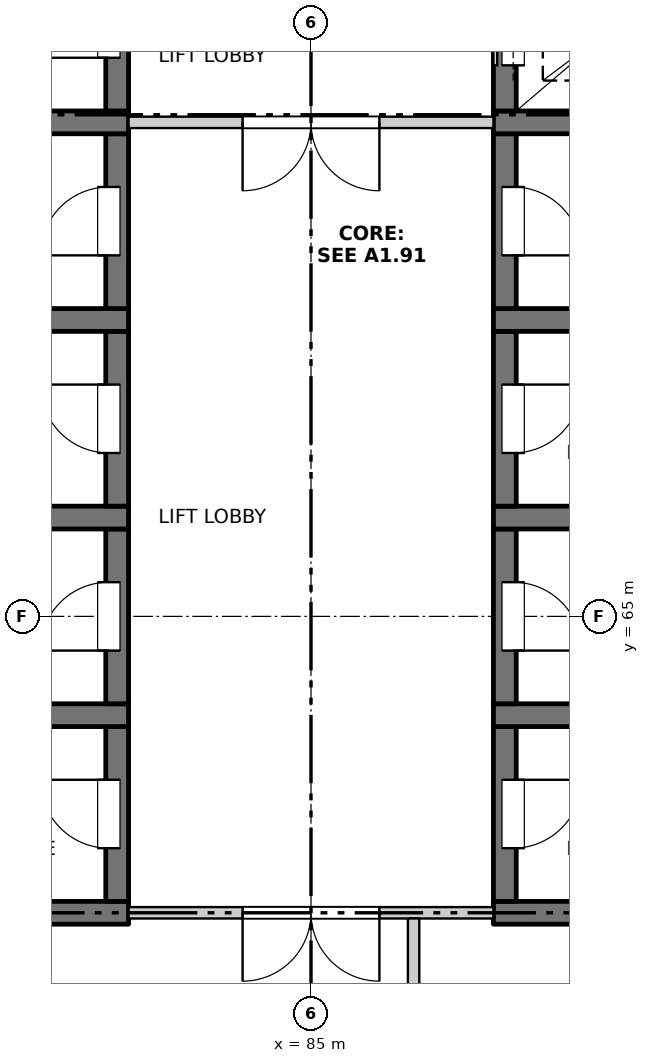
"""IFC4 building model, lengths in metres.
Left out: names, types, materials, properties, quantities, classifications, styles, units other than length and angle.
Written with IfcOpenShell. Run it as: python <this file> out.ifc"""

import sys

from ifc_helpers import new_model, si_unit, direction, frame, frame_2d, origin, place, context, subcontext, project, spatial, rectangle, extrude, element, fill, save


model = new_model("IFC4")
c1 = context("Model", 3, precision=1e-05, world=origin(), true_north=direction((0.0, 1.0)))
c2 = subcontext(c1, "Body", "Model", "MODEL_VIEW")
j1 = project(units=[si_unit("LENGTHUNIT", "METRE"), si_unit("PLANEANGLEUNIT", "RADIAN")], contexts=[c1])
p1 = place(None, origin())
s1 = spatial("IfcSite", under=j1, at=p1, CompositionType="ELEMENT")
p2 = place(p1, origin())
s2 = spatial("IfcBuilding", under=s1, at=p2, CompositionType="ELEMENT")
p3 = place(p2, frame((0.0, 0.0, 140.7)))
s3 = spatial("IfcBuildingStorey", under=s2, at=p3, CompositionType="ELEMENT", Elevation=140.7)
p4 = place(p3, frame((79.6, 61.1, -0.25), z_axis=(0.0, 0.0, 1.0), x_axis=(1.0, 0.0, 0.0)))
e1 = element("IfcWall", 1, at=p4, inside=s3, PredefinedType="SOLIDWALL", context=c2, shape_type="SweptSolid", body=[
    extrude(rectangle(XDim=3.0, YDim=0.3, at=frame_2d((1.5, 0.0))), origin(), (0.0, 0.0, 1.0), 3.35),
])
p5 = place(p3, frame((82.45, 61.25, -0.25), z_axis=(0.0, 0.0, 1.0), x_axis=(0.0, 1.0, 0.0)))
e2 = element("IfcWall", 2, at=p5, inside=s3, PredefinedType="SOLIDWALL", context=c2, shape_type="SweptSolid", body=[
    extrude(rectangle(XDim=2.3, YDim=0.3, at=frame_2d((1.15, 0.0))), origin(), (0.0, 0.0, 1.0), 3.35),
])
p6 = place(p5, frame((0.7, 0.0, 0.25)))
e3 = element("IfcOpeningElement", 3, at=p6, cuts=e2, PredefinedType="OPENING", context=c2, shape_type="SweptSolid", body=[
    extrude(rectangle(XDim=0.9, YDim=2.1, at=frame_2d((0.45, 1.05))), frame((0.0, 0.16, 0.0), z_axis=(0.0, -1.0, 0.0), x_axis=(1.0, 0.0, 0.0)), (0.0, 0.0, 1.0), 0.32),
])
p7 = place(p3, frame((79.6, 63.7, -0.25), z_axis=(0.0, 0.0, 1.0), x_axis=(1.0, 0.0, 0.0)))
e4 = element("IfcWall", 4, at=p7, inside=s3, PredefinedType="SOLIDWALL", context=c2, shape_type="SweptSolid", body=[
    extrude(rectangle(XDim=3.0, YDim=0.3, at=frame_2d((1.5, 0.0))), origin(), (0.0, 0.0, 1.0), 3.35),
])
p8 = place(p3, frame((82.45, 63.85, -0.25), z_axis=(0.0, 0.0, 1.0), x_axis=(0.0, 1.0, 0.0)))
e5 = element("IfcWall", 5, at=p8, inside=s3, PredefinedType="SOLIDWALL", context=c2, shape_type="SweptSolid", body=[
    extrude(rectangle(XDim=2.3, YDim=0.3, at=frame_2d((1.15, 0.0))), origin(), (0.0, 0.0, 1.0), 3.35),
])
p9 = place(p8, frame((0.7, 0.0, 0.25)))
e6 = element("IfcOpeningElement", 6, at=p9, cuts=e5, PredefinedType="OPENING", context=c2, shape_type="SweptSolid", body=[
    extrude(rectangle(XDim=0.9, YDim=2.1, at=frame_2d((0.45, 1.05))), frame((0.0, 0.16, 0.0), z_axis=(0.0, -1.0, 0.0), x_axis=(1.0, 0.0, 0.0)), (0.0, 0.0, 1.0), 0.32),
])
p10 = place(p3, frame((79.6, 66.3, -0.25), z_axis=(0.0, 0.0, 1.0), x_axis=(1.0, 0.0, 0.0)))
e7 = element("IfcWall", 7, at=p10, inside=s3, PredefinedType="SOLIDWALL", context=c2, shape_type="SweptSolid", body=[
    extrude(rectangle(XDim=3.0, YDim=0.3, at=frame_2d((1.5, 0.0))), origin(), (0.0, 0.0, 1.0), 3.35),
])
p11 = place(p3, frame((82.45, 66.45, -0.25), z_axis=(0.0, 0.0, 1.0), x_axis=(0.0, 1.0, 0.0)))
e8 = element("IfcWall", 8, at=p11, inside=s3, PredefinedType="SOLIDWALL", context=c2, shape_type="SweptSolid", body=[
    extrude(rectangle(XDim=2.3, YDim=0.3, at=frame_2d((1.15, 0.0))), origin(), (0.0, 0.0, 1.0), 3.35),
])
p12 = place(p11, frame((0.7, 0.0, 0.25)))
e9 = element("IfcOpeningElement", 9, at=p12, cuts=e8, PredefinedType="OPENING", context=c2, shape_type="SweptSolid", body=[
    extrude(rectangle(XDim=0.9, YDim=2.1, at=frame_2d((0.45, 1.05))), frame((0.0, 0.16, 0.0), z_axis=(0.0, -1.0, 0.0), x_axis=(1.0, 0.0, 0.0)), (0.0, 0.0, 1.0), 0.32),
])
p13 = place(p3, frame((79.6, 68.9, -0.25), z_axis=(0.0, 0.0, 1.0), x_axis=(1.0, 0.0, 0.0)))
e10 = element("IfcWall", 10, at=p13, inside=s3, PredefinedType="SOLIDWALL", context=c2, shape_type="SweptSolid", body=[
    extrude(rectangle(XDim=3.0, YDim=0.3, at=frame_2d((1.5, 0.0))), origin(), (0.0, 0.0, 1.0), 3.35),
])
p14 = place(p3, frame((82.45, 69.05, -0.25), z_axis=(0.0, 0.0, 1.0), x_axis=(0.0, 1.0, 0.0)))
e11 = element("IfcWall", 11, at=p14, inside=s3, PredefinedType="SOLIDWALL", context=c2, shape_type="SweptSolid", body=[
    extrude(rectangle(XDim=2.3, YDim=0.3, at=frame_2d((1.15, 0.0))), origin(), (0.0, 0.0, 1.0), 3.35),
])
p15 = place(p14, frame((0.7, 0.0, 0.25)))
e12 = element("IfcOpeningElement", 12, at=p15, cuts=e11, PredefinedType="OPENING", context=c2, shape_type="SweptSolid", body=[
    extrude(rectangle(XDim=0.9, YDim=2.1, at=frame_2d((0.45, 1.05))), frame((0.0, 0.16, 0.0), z_axis=(0.0, -1.0, 0.0), x_axis=(1.0, 0.0, 0.0)), (0.0, 0.0, 1.0), 0.32),
])
p16 = place(p3, frame((79.6, 71.5, -0.25), z_axis=(0.0, 0.0, 1.0), x_axis=(1.0, 0.0, 0.0)))
e13 = element("IfcWall", 13, at=p16, inside=s3, PredefinedType="SOLIDWALL", context=c2, shape_type="SweptSolid", body=[
    extrude(rectangle(XDim=3.0, YDim=0.3, at=frame_2d((1.5, 0.0))), origin(), (0.0, 0.0, 1.0), 3.35),
])
p17 = place(p3, frame((82.45, 71.65, -0.25), z_axis=(0.0, 0.0, 1.0), x_axis=(0.0, 1.0, 0.0)))
e14 = element("IfcWall", 14, at=p17, inside=s3, PredefinedType="SOLIDWALL", context=c2, shape_type="SweptSolid", body=[
    extrude(rectangle(XDim=2.3, YDim=0.3, at=frame_2d((1.15, 0.0))), origin(), (0.0, 0.0, 1.0), 3.35),
])
p18 = place(p17, frame((0.7, 0.0, 0.25)))
e15 = element("IfcOpeningElement", 15, at=p18, cuts=e14, PredefinedType="OPENING", context=c2, shape_type="SweptSolid", body=[
    extrude(rectangle(XDim=0.9, YDim=2.1, at=frame_2d((0.45, 1.05))), frame((0.0, 0.16, 0.0), z_axis=(0.0, -1.0, 0.0), x_axis=(1.0, 0.0, 0.0)), (0.0, 0.0, 1.0), 0.32),
])
p19 = place(p3, frame((87.4, 61.1, -0.25), z_axis=(0.0, 0.0, 1.0), x_axis=(1.0, 0.0, 0.0)))
e16 = element("IfcWall", 16, at=p19, inside=s3, PredefinedType="SOLIDWALL", context=c2, shape_type="SweptSolid", body=[
    extrude(rectangle(XDim=3.0, YDim=0.3, at=frame_2d((1.5, 0.0))), origin(), (0.0, 0.0, 1.0), 3.35),
])
p20 = place(p3, frame((87.55, 61.25, -0.25), z_axis=(0.0, 0.0, 1.0), x_axis=(0.0, 1.0, 0.0)))
e17 = element("IfcWall", 17, at=p20, inside=s3, PredefinedType="SOLIDWALL", context=c2, shape_type="SweptSolid", body=[
    extrude(rectangle(XDim=2.3, YDim=0.3, at=frame_2d((1.15, 0.0))), origin(), (0.0, 0.0, 1.0), 3.35),
])
p21 = place(p20, frame((0.7, 0.0, 0.25)))
e18 = element("IfcOpeningElement", 18, at=p21, cuts=e17, PredefinedType="OPENING", context=c2, shape_type="SweptSolid", body=[
    extrude(rectangle(XDim=0.9, YDim=2.1, at=frame_2d((0.45, 1.05))), frame((0.0, 0.16, 0.0), z_axis=(0.0, -1.0, 0.0), x_axis=(1.0, 0.0, 0.0)), (0.0, 0.0, 1.0), 0.32),
])
p22 = place(p3, frame((87.4, 63.7, -0.25), z_axis=(0.0, 0.0, 1.0), x_axis=(1.0, 0.0, 0.0)))
e19 = element("IfcWall", 19, at=p22, inside=s3, PredefinedType="SOLIDWALL", context=c2, shape_type="SweptSolid", body=[
    extrude(rectangle(XDim=3.0, YDim=0.3, at=frame_2d((1.5, 0.0))), origin(), (0.0, 0.0, 1.0), 3.35),
])
p23 = place(p3, frame((87.55, 63.85, -0.25), z_axis=(0.0, 0.0, 1.0), x_axis=(0.0, 1.0, 0.0)))
e20 = element("IfcWall", 20, at=p23, inside=s3, PredefinedType="SOLIDWALL", context=c2, shape_type="SweptSolid", body=[
    extrude(rectangle(XDim=2.3, YDim=0.3, at=frame_2d((1.15, 0.0))), origin(), (0.0, 0.0, 1.0), 3.35),
])
p24 = place(p23, frame((0.7, 0.0, 0.25)))
e21 = element("IfcOpeningElement", 21, at=p24, cuts=e20, PredefinedType="OPENING", context=c2, shape_type="SweptSolid", body=[
    extrude(rectangle(XDim=0.9, YDim=2.1, at=frame_2d((0.45, 1.05))), frame((0.0, 0.16, 0.0), z_axis=(0.0, -1.0, 0.0), x_axis=(1.0, 0.0, 0.0)), (0.0, 0.0, 1.0), 0.32),
])
p25 = place(p3, frame((87.4, 66.3, -0.25), z_axis=(0.0, 0.0, 1.0), x_axis=(1.0, 0.0, 0.0)))
e22 = element("IfcWall", 22, at=p25, inside=s3, PredefinedType="SOLIDWALL", context=c2, shape_type="SweptSolid", body=[
    extrude(rectangle(XDim=3.0, YDim=0.3, at=frame_2d((1.5, 0.0))), origin(), (0.0, 0.0, 1.0), 3.35),
])
p26 = place(p3, frame((87.55, 66.45, -0.25), z_axis=(0.0, 0.0, 1.0), x_axis=(0.0, 1.0, 0.0)))
e23 = element("IfcWall", 23, at=p26, inside=s3, PredefinedType="SOLIDWALL", context=c2, shape_type="SweptSolid", body=[
    extrude(rectangle(XDim=2.3, YDim=0.3, at=frame_2d((1.15, 0.0))), origin(), (0.0, 0.0, 1.0), 3.35),
])
p27 = place(p26, frame((0.7, 0.0, 0.25)))
e24 = element("IfcOpeningElement", 24, at=p27, cuts=e23, PredefinedType="OPENING", context=c2, shape_type="SweptSolid", body=[
    extrude(rectangle(XDim=0.9, YDim=2.1, at=frame_2d((0.45, 1.05))), frame((0.0, 0.16, 0.0), z_axis=(0.0, -1.0, 0.0), x_axis=(1.0, 0.0, 0.0)), (0.0, 0.0, 1.0), 0.32),
])
p28 = place(p3, frame((87.4, 68.9, -0.25), z_axis=(0.0, 0.0, 1.0), x_axis=(1.0, 0.0, 0.0)))
e25 = element("IfcWall", 25, at=p28, inside=s3, PredefinedType="SOLIDWALL", context=c2, shape_type="SweptSolid", body=[
    extrude(rectangle(XDim=3.0, YDim=0.3, at=frame_2d((1.5, 0.0))), origin(), (0.0, 0.0, 1.0), 3.35),
])
p29 = place(p3, frame((87.55, 69.05, -0.25), z_axis=(0.0, 0.0, 1.0), x_axis=(0.0, 1.0, 0.0)))
e26 = element("IfcWall", 26, at=p29, inside=s3, PredefinedType="SOLIDWALL", context=c2, shape_type="SweptSolid", body=[
    extrude(rectangle(XDim=2.3, YDim=0.3, at=frame_2d((1.15, 0.0))), origin(), (0.0, 0.0, 1.0), 3.35),
])
p30 = place(p29, frame((0.7, 0.0, 0.25)))
e27 = element("IfcOpeningElement", 27, at=p30, cuts=e26, PredefinedType="OPENING", context=c2, shape_type="SweptSolid", body=[
    extrude(rectangle(XDim=0.9, YDim=2.1, at=frame_2d((0.45, 1.05))), frame((0.0, 0.16, 0.0), z_axis=(0.0, -1.0, 0.0), x_axis=(1.0, 0.0, 0.0)), (0.0, 0.0, 1.0), 0.32),
])
p31 = place(p3, frame((87.4, 71.5, -0.25), z_axis=(0.0, 0.0, 1.0), x_axis=(1.0, 0.0, 0.0)))
e28 = element("IfcWall", 28, at=p31, inside=s3, PredefinedType="SOLIDWALL", context=c2, shape_type="SweptSolid", body=[
    extrude(rectangle(XDim=3.0, YDim=0.3, at=frame_2d((1.5, 0.0))), origin(), (0.0, 0.0, 1.0), 3.35),
])
p32 = place(p3, frame((87.55, 71.65, -0.25), z_axis=(0.0, 0.0, 1.0), x_axis=(0.0, 1.0, 0.0)))
e29 = element("IfcWall", 29, at=p32, inside=s3, PredefinedType="SOLIDWALL", context=c2, shape_type="SweptSolid", body=[
    extrude(rectangle(XDim=2.3, YDim=0.3, at=frame_2d((1.15, 0.0))), origin(), (0.0, 0.0, 1.0), 3.35),
])
p33 = place(p32, frame((0.6, 0.0, 0.25)))
e30 = element("IfcOpeningElement", 30, at=p33, cuts=e29, PredefinedType="OPENING", context=c2, shape_type="SweptSolid", body=[
    extrude(rectangle(XDim=1.1, YDim=2.1, at=frame_2d((0.55, 1.05))), frame((0.0, 0.16, 0.0), z_axis=(0.0, -1.0, 0.0), x_axis=(1.0, 0.0, 0.0)), (0.0, 0.0, 1.0), 0.32),
])
p34 = place(p3, frame((82.6, 61.1, 0.0), z_axis=(0.0, 0.0, 1.0), x_axis=(1.0, 0.0, 0.0)))
e31 = element("IfcWall", 31, at=p34, inside=s3, PredefinedType="PARTITIONING", context=c2, shape_type="SweptSolid", body=[
    extrude(rectangle(XDim=4.8, YDim=0.15, at=frame_2d((2.4, 0.0))), origin(), (0.0, 0.0, 1.0), 3.1),
])
p35 = place(p34, frame((1.5, 0.0, 0.0)))
e32 = element("IfcOpeningElement", 32, at=p35, cuts=e31, PredefinedType="OPENING", context=c2, shape_type="SweptSolid", body=[
    extrude(rectangle(XDim=1.8, YDim=2.1, at=frame_2d((0.9, 1.05))), frame((0.0, 0.085, 0.0), z_axis=(0.0, -1.0, 0.0), x_axis=(1.0, 0.0, 0.0)), (0.0, 0.0, 1.0), 0.17),
])
p36 = place(p3, frame((82.6, 71.5, 0.0), z_axis=(0.0, 0.0, 1.0), x_axis=(1.0, 0.0, 0.0)))
e33 = element("IfcWall", 33, at=p36, inside=s3, PredefinedType="PARTITIONING", context=c2, shape_type="SweptSolid", body=[
    extrude(rectangle(XDim=4.8, YDim=0.15, at=frame_2d((2.4, 0.0))), origin(), (0.0, 0.0, 1.0), 3.1),
])
p37 = place(p36, frame((1.5, 0.0, 0.0)))
e34 = element("IfcOpeningElement", 34, at=p37, cuts=e33, PredefinedType="OPENING", context=c2, shape_type="SweptSolid", body=[
    extrude(rectangle(XDim=1.8, YDim=2.1, at=frame_2d((0.9, 1.05))), frame((0.0, 0.085, 0.0), z_axis=(0.0, -1.0, 0.0), x_axis=(1.0, 0.0, 0.0)), (0.0, 0.0, 1.0), 0.17),
])
p38 = place(p3, frame((86.35, 55.525, 0.0), z_axis=(0.0, 0.0, 1.0), x_axis=(0.0, 1.0, 0.0)))
e35 = element("IfcWall", 35, at=p38, inside=s3, PredefinedType="PARTITIONING", context=c2, shape_type="SweptSolid", body=[
    extrude(rectangle(XDim=5.5, YDim=0.15, at=frame_2d((2.75, 0.0))), origin(), (0.0, 0.0, 1.0), 3.1),
])
p39 = place(p38, frame((2.175, 0.0, 0.0)))
e36 = element("IfcOpeningElement", 36, at=p39, cuts=e35, PredefinedType="OPENING", context=c2, shape_type="SweptSolid", body=[
    extrude(rectangle(XDim=0.9, YDim=2.1, at=frame_2d((0.45, 1.05))), frame((0.0, 0.085, 0.0), z_axis=(0.0, -1.0, 0.0), x_axis=(1.0, 0.0, 0.0)), (0.0, 0.0, 1.0), 0.17),
])
p40 = place(p35, origin())
e37 = element("IfcDoor", 37, at=p40, inside=s3, OperationType="DOUBLE_DOOR_SINGLE_SWING", PredefinedType="DOOR", context=c2, shape_type="SweptSolid", body=[
    extrude(rectangle(XDim=1.8, YDim=2.1, at=frame_2d((0.9, 1.05))), frame((0.0, 0.025, 0.0), z_axis=(0.0, -1.0, 0.0), x_axis=(1.0, 0.0, 0.0)), (0.0, 0.0, 1.0), 0.05),
])
fill(e32, e37)
p41 = place(p6, origin())
e38 = element("IfcDoor", 38, at=p41, inside=s3, OperationType="SINGLE_SWING_RIGHT", PredefinedType="DOOR", context=c2, shape_type="SweptSolid", body=[
    extrude(rectangle(XDim=0.9, YDim=2.1, at=frame_2d((0.45, 1.05))), frame((0.0, 0.135, 0.0), z_axis=(0.0, -1.0, 0.0), x_axis=(1.0, 0.0, 0.0)), (0.0, 0.0, 1.0), 0.05),
])
fill(e3, e38)
p42 = place(p21, origin())
e39 = element("IfcDoor", 39, at=p42, inside=s3, OperationType="SINGLE_SWING_LEFT", PredefinedType="DOOR", context=c2, shape_type="SweptSolid", body=[
    extrude(rectangle(XDim=0.9, YDim=2.1, at=frame_2d((0.45, 1.05))), frame((0.0, -0.085, 0.0), z_axis=(0.0, -1.0, 0.0), x_axis=(1.0, 0.0, 0.0)), (0.0, 0.0, 1.0), 0.05),
])
fill(e18, e39)
p43 = place(p9, origin())
e40 = element("IfcDoor", 40, at=p43, inside=s3, OperationType="SINGLE_SWING_LEFT", PredefinedType="DOOR", context=c2, shape_type="SweptSolid", body=[
    extrude(rectangle(XDim=0.9, YDim=2.1, at=frame_2d((0.45, 1.05))), frame((0.0, 0.135, 0.0), z_axis=(0.0, -1.0, 0.0), x_axis=(1.0, 0.0, 0.0)), (0.0, 0.0, 1.0), 0.05),
])
fill(e6, e40)
p44 = place(p24, origin())
e41 = element("IfcDoor", 41, at=p44, inside=s3, OperationType="SINGLE_SWING_RIGHT", PredefinedType="DOOR", context=c2, shape_type="SweptSolid", body=[
    extrude(rectangle(XDim=0.9, YDim=2.1, at=frame_2d((0.45, 1.05))), frame((0.0, -0.085, 0.0), z_axis=(0.0, -1.0, 0.0), x_axis=(1.0, 0.0, 0.0)), (0.0, 0.0, 1.0), 0.05),
])
fill(e21, e41)
p45 = place(p12, origin())
e42 = element("IfcDoor", 42, at=p45, inside=s3, OperationType="SINGLE_SWING_RIGHT", PredefinedType="DOOR", context=c2, shape_type="SweptSolid", body=[
    extrude(rectangle(XDim=0.9, YDim=2.1, at=frame_2d((0.45, 1.05))), frame((0.0, 0.135, 0.0), z_axis=(0.0, -1.0, 0.0), x_axis=(1.0, 0.0, 0.0)), (0.0, 0.0, 1.0), 0.05),
])
fill(e9, e42)
p46 = place(p27, origin())
e43 = element("IfcDoor", 43, at=p46, inside=s3, OperationType="SINGLE_SWING_LEFT", PredefinedType="DOOR", context=c2, shape_type="SweptSolid", body=[
    extrude(rectangle(XDim=0.9, YDim=2.1, at=frame_2d((0.45, 1.05))), frame((0.0, -0.085, 0.0), z_axis=(0.0, -1.0, 0.0), x_axis=(1.0, 0.0, 0.0)), (0.0, 0.0, 1.0), 0.05),
])
fill(e24, e43)
p47 = place(p15, origin())
e44 = element("IfcDoor", 44, at=p47, inside=s3, OperationType="SINGLE_SWING_LEFT", PredefinedType="DOOR", context=c2, shape_type="SweptSolid", body=[
    extrude(rectangle(XDim=0.9, YDim=2.1, at=frame_2d((0.45, 1.05))), frame((0.0, 0.135, 0.0), z_axis=(0.0, -1.0, 0.0), x_axis=(1.0, 0.0, 0.0)), (0.0, 0.0, 1.0), 0.05),
])
fill(e12, e44)
p48 = place(p30, origin())
e45 = element("IfcDoor", 45, at=p48, inside=s3, OperationType="SINGLE_SWING_RIGHT", PredefinedType="DOOR", context=c2, shape_type="SweptSolid", body=[
    extrude(rectangle(XDim=0.9, YDim=2.1, at=frame_2d((0.45, 1.05))), frame((0.0, -0.085, 0.0), z_axis=(0.0, -1.0, 0.0), x_axis=(1.0, 0.0, 0.0)), (0.0, 0.0, 1.0), 0.05),
])
fill(e27, e45)
p49 = place(p37, origin())
e46 = element("IfcDoor", 46, at=p49, inside=s3, OperationType="DOUBLE_DOOR_SINGLE_SWING", PredefinedType="DOOR", context=c2, shape_type="SweptSolid", body=[
    extrude(rectangle(XDim=1.8, YDim=2.1, at=frame_2d((0.9, 1.05))), frame((0.0, 0.025, 0.0), z_axis=(0.0, -1.0, 0.0), x_axis=(1.0, 0.0, 0.0)), (0.0, 0.0, 1.0), 0.05),
])
fill(e34, e46)
p50 = place(p18, origin())
e47 = element("IfcDoor", 47, at=p50, inside=s3, OperationType="SINGLE_SWING_LEFT", PredefinedType="DOOR", context=c2, shape_type="SweptSolid", body=[
    extrude(rectangle(XDim=0.9, YDim=2.1, at=frame_2d((0.45, 1.05))), frame((0.0, 0.135, 0.0), z_axis=(0.0, -1.0, 0.0), x_axis=(1.0, 0.0, 0.0)), (0.0, 0.0, 1.0), 0.05),
])
fill(e15, e47)
p51 = place(p33, origin())
e48 = element("IfcDoor", 48, at=p51, inside=s3, OperationType="SLIDING_TO_LEFT", PredefinedType="DOOR", context=c2, shape_type="SweptSolid", body=[
    extrude(rectangle(XDim=1.1, YDim=2.1, at=frame_2d((0.55, 1.05))), frame((0.0, -0.085, 0.0), z_axis=(0.0, -1.0, 0.0), x_axis=(1.0, 0.0, 0.0)), (0.0, 0.0, 1.0), 0.05),
])
fill(e30, e48)
save(model, sys.argv[1])
